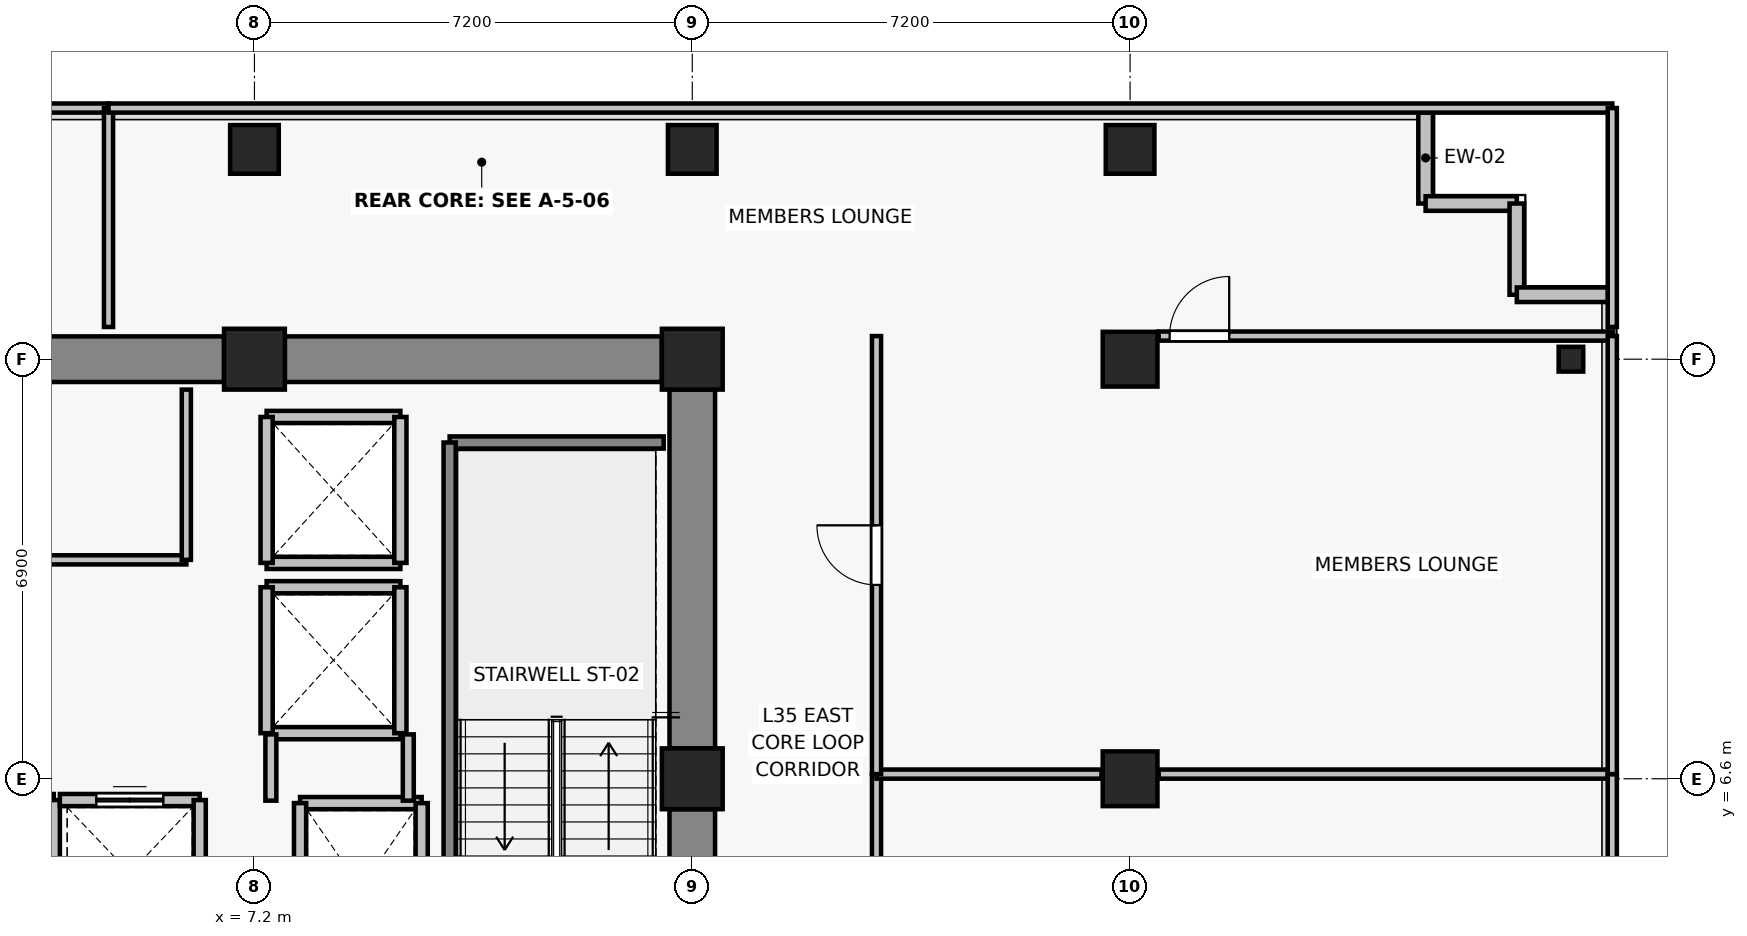
"""IFC4 building model, lengths in metres.
Left out: names, types, materials, properties, quantities, classifications, styles, units other than length and angle.
Written with IfcOpenShell. Run it as: python <this file> out.ifc"""

import sys

from ifc_helpers import new_model, si_unit, direction, frame, frame_2d, origin, origin_2d, place, context, subcontext, project, spatial, rectangle, i_section, extrude, source, transform, mapped, element, fill, save


model = new_model("IFC4")
c1 = context("Model", 3, precision=1e-05, world=origin(), true_north=direction((0.0, 1.0)))
c2 = subcontext(c1, "Body", "Model", "MODEL_VIEW")
j1 = project(units=[si_unit("LENGTHUNIT", "METRE"), si_unit("PLANEANGLEUNIT", "RADIAN")], contexts=[c1])
p1 = place(None, origin())
s1 = spatial("IfcSite", under=j1, at=p1, CompositionType="ELEMENT")
p2 = place(p1, origin())
s2 = spatial("IfcBuilding", under=s1, at=p2, CompositionType="ELEMENT")
p3 = place(p2, frame((0.0, 0.0, 126.4)))
s3 = spatial("IfcBuildingStorey", under=s2, at=p3, CompositionType="ELEMENT", Elevation=126.4)
for number, where, z_axis, x_axis in (
    (1, (14.4, 6.6, 0.0), (0.0, 0.0, 1.0), (1.0, 0.0, 0.0)),
    (2, (7.2, 13.5, 0.0), (0.0, 0.0, 1.0), (1.0, 0.0, 0.0)),
    (3, (14.4, 13.5, 0.0), (0.0, 0.0, 1.0), (1.0, 0.0, 0.0)),
):
    element("IfcColumn", number, at=place(p3, frame(where, z_axis=z_axis, x_axis=x_axis)), inside=s3, PredefinedType="COLUMN", context=c2, shape_type="SweptSolid", body=[
        extrude(rectangle(XDim=1.0, YDim=1.0, at=origin_2d()), origin(), (0.0, 0.0, 1.0), 3.3),
    ])
for number, where, z_axis, x_axis in (
    (4, (21.6, 6.6, 0.0), (0.0, 0.0, 1.0), (1.0, 0.0, 0.0)),
    (5, (21.6, 13.5, 0.0), (0.0, 0.0, 1.0), (1.0, 0.0, 0.0)),
):
    element("IfcColumn", number, at=place(p3, frame(where, z_axis=z_axis, x_axis=x_axis)), inside=s3, PredefinedType="COLUMN", context=c2, shape_type="SweptSolid", body=[
        extrude(rectangle(XDim=0.9, YDim=0.9, at=origin_2d()), origin(), (0.0, 0.0, 1.0), 3.3),
    ])
for number, where, z_axis, x_axis in (
    (6, (7.2, 16.95, 0.0), (0.0, 0.0, 1.0), (1.0, 0.0, 0.0)),
    (7, (14.4, 16.95, 0.0), (0.0, 0.0, 1.0), (1.0, 0.0, 0.0)),
    (8, (21.6, 16.95, 0.0), (0.0, 0.0, 1.0), (1.0, 0.0, 0.0)),
):
    element("IfcColumn", number, at=place(p3, frame(where, z_axis=z_axis, x_axis=x_axis)), inside=s3, PredefinedType="COLUMN", context=c2, shape_type="SweptSolid", body=[
        extrude(rectangle(XDim=0.8, YDim=0.8, at=origin_2d()), origin(), (0.0, 0.0, 1.0), 3.3),
    ])
p4 = place(p3, frame((28.85, 13.5, 0.0), z_axis=(0.0, 0.0, 1.0), x_axis=(1.0, 0.0, 0.0)))
e9 = element("IfcColumn", 9, at=p4, inside=s3, PredefinedType="COLUMN", context=c2, shape_type="SweptSolid", body=[
    extrude(i_section(OverallWidth=0.404, OverallDepth=0.407, WebThickness=0.022, FlangeThickness=0.032, FilletRadius=0.015, at=origin_2d()), origin(), (0.0, 0.0, 1.0), 3.3),
])
p5 = place(p3, frame((-6.7, 13.5, 0.0), z_axis=(0.0, 0.0, 1.0), x_axis=(1.0, 0.0, 0.0)))
e10 = element("IfcWall", 10, at=p5, inside=s3, PredefinedType="SHEAR", context=c2, shape_type="SweptSolid", body=[
    extrude(rectangle(XDim=13.4, YDim=0.75, at=frame_2d((6.7, 0.0))), origin(), (0.0, 0.0, 1.0), 3.075),
])
p6 = place(p3, frame((7.7, 13.5, 0.0), z_axis=(0.0, 0.0, 1.0), x_axis=(1.0, 0.0, 0.0)))
e11 = element("IfcWall", 11, at=p6, inside=s3, PredefinedType="SHEAR", context=c2, shape_type="SweptSolid", body=[
    extrude(rectangle(XDim=6.2, YDim=0.75, at=frame_2d((3.1, 0.0))), origin(), (0.0, 0.0, 1.0), 3.075),
])
p7 = place(p3, frame((14.4, -0.7, 0.0), z_axis=(0.0, 0.0, 1.0), x_axis=(0.0, 1.0, 0.0)))
e12 = element("IfcWall", 12, at=p7, inside=s3, PredefinedType="SHEAR", context=c2, shape_type="SweptSolid", body=[
    extrude(rectangle(XDim=6.8, YDim=0.75, at=frame_2d((3.4, 0.0))), origin(), (0.0, 0.0, 1.0), 3.075),
])
p8 = place(p3, frame((14.4, 7.1, 0.0), z_axis=(0.0, 0.0, 1.0), x_axis=(0.0, 1.0, 0.0)))
e13 = element("IfcWall", 13, at=p8, inside=s3, PredefinedType="SHEAR", context=c2, shape_type="SweptSolid", body=[
    extrude(rectangle(XDim=5.9, YDim=0.75, at=frame_2d((2.95, 0.0))), origin(), (0.0, 0.0, 1.0), 3.075),
])
for number, where, z_axis, x_axis in (
    (14, (26.46, 16.06, 0.0), (0.0, 0.0, 1.0), (0.0, 1.0, 0.0)),
    (15, (27.96, 16.06, 0.0), (0.0, 0.0, 1.0), (-1.0, 0.0, 0.0)),
    (16, (27.96, 14.56, 0.0), (0.0, 0.0, 1.0), (0.0, 1.0, 0.0)),
    (17, (29.46, 14.56, 0.0), (0.0, 0.0, 1.0), (-1.0, 0.0, 0.0)),
):
    element("IfcWall", number, at=place(p3, frame(where, z_axis=z_axis, x_axis=x_axis)), inside=s3, PredefinedType="SOLIDWALL", context=c2, shape_type="SweptSolid", body=[
        extrude(rectangle(XDim=1.5, YDim=0.24, at=frame_2d((0.75, 0.0))), origin(), (0.0, 0.0, 1.0), 3.075),
    ])
p9 = place(p3, frame((7.95, 6.2, 0.0), z_axis=(0.0, 0.0, 1.0), x_axis=(1.0, 0.0, 0.0)))
e18 = element("IfcWall", 18, at=p9, inside=s3, PredefinedType="SOLIDWALL", context=c2, shape_type="SweptSolid", body=[
    extrude(rectangle(XDim=2.0, YDim=0.2, at=frame_2d((1.0, 0.0))), origin(), (0.0, 0.0, 1.0), 3.075),
])
for number, where, z_axis, x_axis in (
    (19, (7.95, 3.4, 0.0), (0.0, 0.0, 1.0), (0.0, 1.0, 0.0)),
    (20, (9.95, 6.2, 0.0), (0.0, 0.0, 1.0), (0.0, -1.0, 0.0)),
):
    element("IfcWall", number, at=place(p3, frame(where, z_axis=z_axis, x_axis=x_axis)), inside=s3, PredefinedType="SOLIDWALL", context=c2, shape_type="SweptSolid", body=[
        extrude(rectangle(XDim=2.8, YDim=0.2, at=frame_2d((1.4, 0.0))), origin(), (0.0, 0.0, 1.0), 3.075),
    ])
p10 = place(p3, frame((1.6, 6.25, 0.0), z_axis=(0.0, 0.0, 1.0), x_axis=(1.0, 0.0, 0.0)))
e21 = element("IfcWall", 21, at=p10, inside=s3, PredefinedType="SOLIDWALL", context=c2, shape_type="SweptSolid", body=[
    extrude(rectangle(XDim=2.3, YDim=0.2, at=frame_2d((1.15, 0.0))), origin(), (0.0, 0.0, 1.0), 3.075),
])
p11 = place(p10, frame((0.6, 0.0, 0.0)))
e22 = element("IfcOpeningElement", 22, at=p11, cuts=e21, PredefinedType="OPENING", context=c2, shape_type="SweptSolid", body=[
    extrude(rectangle(XDim=1.1, YDim=2.2, at=frame_2d((0.55, 1.1))), frame((0.0, 0.11, 0.0), z_axis=(0.0, -1.0, 0.0), x_axis=(1.0, 0.0, 0.0)), (0.0, 0.0, 1.0), 0.22),
])
p12 = place(p3, frame((3.9, 6.25, 0.0), z_axis=(0.0, 0.0, 1.0), x_axis=(0.0, -1.0, 0.0)))
e23 = element("IfcWall", 23, at=p12, inside=s3, PredefinedType="SOLIDWALL", context=c2, shape_type="SweptSolid", body=[
    extrude(rectangle(XDim=2.4, YDim=0.2, at=frame_2d((1.2, 0.0))), origin(), (0.0, 0.0, 1.0), 3.075),
])
p13 = place(p3, frame((4.0, 6.25, 0.0), z_axis=(0.0, 0.0, 1.0), x_axis=(1.0, 0.0, 0.0)))
e24 = element("IfcWall", 24, at=p13, inside=s3, PredefinedType="SOLIDWALL", context=c2, shape_type="SweptSolid", body=[
    extrude(rectangle(XDim=2.3, YDim=0.2, at=frame_2d((1.15, 0.0))), origin(), (0.0, 0.0, 1.0), 3.075),
])
p14 = place(p13, frame((0.6, 0.0, 0.0)))
e25 = element("IfcOpeningElement", 25, at=p14, cuts=e24, PredefinedType="OPENING", context=c2, shape_type="SweptSolid", body=[
    extrude(rectangle(XDim=1.1, YDim=2.2, at=frame_2d((0.55, 1.1))), frame((0.0, 0.11, 0.0), z_axis=(0.0, -1.0, 0.0), x_axis=(1.0, 0.0, 0.0)), (0.0, 0.0, 1.0), 0.22),
])
p15 = place(p3, frame((6.3, 6.25, 0.0), z_axis=(0.0, 0.0, 1.0), x_axis=(0.0, -1.0, 0.0)))
e26 = element("IfcWall", 26, at=p15, inside=s3, PredefinedType="SOLIDWALL", context=c2, shape_type="SweptSolid", body=[
    extrude(rectangle(XDim=2.4, YDim=0.2, at=frame_2d((1.2, 0.0))), origin(), (0.0, 0.0, 1.0), 3.075),
])
for number, where, z_axis, x_axis in (
    (27, (9.6, 7.35, 0.0), (0.0, 0.0, 1.0), (-1.0, 0.0, 0.0)),
    (28, (7.4, 9.75, 0.0), (0.0, 0.0, 1.0), (1.0, 0.0, 0.0)),
):
    element("IfcWall", number, at=place(p3, frame(where, z_axis=z_axis, x_axis=x_axis)), inside=s3, PredefinedType="SOLIDWALL", context=c2, shape_type="SweptSolid", body=[
        extrude(rectangle(XDim=2.2, YDim=0.2, at=frame_2d((1.1, 0.0))), origin(), (0.0, 0.0, 1.0), 2.515),
    ])
p16 = place(p3, frame((7.4, 7.35, 0.0), z_axis=(0.0, 0.0, 1.0), x_axis=(0.0, 1.0, 0.0)))
e29 = element("IfcWall", 29, at=p16, inside=s3, PredefinedType="SOLIDWALL", context=c2, shape_type="SweptSolid", body=[
    extrude(rectangle(XDim=2.4, YDim=0.2, at=frame_2d((1.2, 0.0))), origin(), (0.0, 0.0, 1.0), 2.515),
])
p17 = place(p3, frame((9.6, 9.75, 0.0), z_axis=(0.0, 0.0, 1.0), x_axis=(0.0, -1.0, 0.0)))
e30 = element("IfcWall", 30, at=p17, inside=s3, PredefinedType="SOLIDWALL", context=c2, shape_type="SweptSolid", body=[
    extrude(rectangle(XDim=2.4, YDim=0.2, at=frame_2d((1.2, 0.0))), origin(), (0.0, 0.0, 1.0), 3.075),
])
for number, where, z_axis, x_axis in (
    (31, (9.6, 10.15, 0.0), (0.0, 0.0, 1.0), (-1.0, 0.0, 0.0)),
    (32, (7.4, 12.55, 0.0), (0.0, 0.0, 1.0), (1.0, 0.0, 0.0)),
):
    element("IfcWall", number, at=place(p3, frame(where, z_axis=z_axis, x_axis=x_axis)), inside=s3, PredefinedType="SOLIDWALL", context=c2, shape_type="SweptSolid", body=[
        extrude(rectangle(XDim=2.2, YDim=0.2, at=frame_2d((1.1, 0.0))), origin(), (0.0, 0.0, 1.0), 2.515),
    ])
p18 = place(p3, frame((7.4, 10.15, 0.0), z_axis=(0.0, 0.0, 1.0), x_axis=(0.0, 1.0, 0.0)))
e33 = element("IfcWall", 33, at=p18, inside=s3, PredefinedType="SOLIDWALL", context=c2, shape_type="SweptSolid", body=[
    extrude(rectangle(XDim=2.4, YDim=0.2, at=frame_2d((1.2, 0.0))), origin(), (0.0, 0.0, 1.0), 2.515),
])
p19 = place(p3, frame((9.6, 12.55, 0.0), z_axis=(0.0, 0.0, 1.0), x_axis=(0.0, -1.0, 0.0)))
e34 = element("IfcWall", 34, at=p19, inside=s3, PredefinedType="SOLIDWALL", context=c2, shape_type="SweptSolid", body=[
    extrude(rectangle(XDim=2.4, YDim=0.2, at=frame_2d((1.2, 0.0))), origin(), (0.0, 0.0, 1.0), 3.075),
])
p20 = place(p3, frame((10.41, 12.13, 0.0), z_axis=(0.0, 0.0, 1.0), x_axis=(1.0, 0.0, 0.0)))
e35 = element("IfcWall", 35, at=p20, inside=s3, PredefinedType="SOLIDWALL", context=c2, shape_type="SweptSolid", body=[
    extrude(rectangle(XDim=3.52, YDim=0.2, at=frame_2d((1.76, 0.0))), origin(), (0.0, 0.0, 1.0), 3.075),
])
p21 = place(p3, frame((10.41, 3.29, 0.0), z_axis=(0.0, 0.0, 1.0), x_axis=(0.0, 1.0, 0.0)))
e36 = element("IfcWall", 36, at=p21, inside=s3, PredefinedType="SOLIDWALL", context=c2, shape_type="SweptSolid", body=[
    extrude(rectangle(XDim=8.84, YDim=0.2, at=frame_2d((4.42, 0.0))), origin(), (0.0, 0.0, 1.0), 3.075),
])
p22 = place(p3, frame((7.47, 6.24, 0.0), z_axis=(0.0, 0.0, 1.0), x_axis=(0.0, 1.0, 0.0)))
e37 = element("IfcWall", 37, at=p22, inside=s3, PredefinedType="PARTITIONING", context=c2, shape_type="SweptSolid", body=[
    extrude(rectangle(XDim=1.09, YDim=0.18, at=frame_2d((0.545, 0.0))), origin(), (0.0, 0.0, 1.0), 2.515),
])
p23 = place(p3, frame((9.73, 7.33, 0.0), z_axis=(0.0, 0.0, 1.0), x_axis=(0.0, -1.0, 0.0)))
e38 = element("IfcWall", 38, at=p23, inside=s3, PredefinedType="PARTITIONING", context=c2, shape_type="SweptSolid", body=[
    extrude(rectangle(XDim=1.09, YDim=0.18, at=frame_2d((0.545, 0.0))), origin(), (0.0, 0.0, 1.0), 3.075),
])
p24 = place(p3, frame((6.08, 10.2, 0.0), z_axis=(0.0, 0.0, 1.0), x_axis=(-1.0, 0.0, 0.0)))
e39 = element("IfcWall", 39, at=p24, inside=s3, PredefinedType="PARTITIONING", context=c2, shape_type="SweptSolid", body=[
    extrude(rectangle(XDim=12.16, YDim=0.15, at=frame_2d((6.08, 0.0))), origin(), (0.0, 0.0, 1.0), 3.075),
])
p25 = place(p24, frame((7.005, 0.0, 0.0)))
e40 = element("IfcOpeningElement", 40, at=p25, cuts=e39, PredefinedType="OPENING", context=c2, shape_type="SweptSolid", body=[
    extrude(rectangle(XDim=1.15, YDim=2.15, at=frame_2d((0.575, 1.075))), frame((0.0, 0.085, 0.0), z_axis=(0.0, -1.0, 0.0), x_axis=(1.0, 0.0, 0.0)), (0.0, 0.0, 1.0), 0.17),
])
p26 = place(p3, frame((6.08, 13.0, 0.0), z_axis=(0.0, 0.0, 1.0), x_axis=(0.0, -1.0, 0.0)))
e41 = element("IfcWall", 41, at=p26, inside=s3, PredefinedType="PARTITIONING", context=c2, shape_type="SweptSolid", body=[
    extrude(rectangle(XDim=2.8, YDim=0.15, at=frame_2d((1.4, 0.0))), origin(), (0.0, 0.0, 1.0), 3.075),
])
p27 = place(p3, frame((22.07, 6.677, 0.0), z_axis=(0.0, 0.0, 1.0), x_axis=(1.0, 0.0, 0.0)))
e42 = element("IfcWall", 42, at=p27, inside=s3, PredefinedType="PARTITIONING", context=c2, shape_type="SweptSolid", body=[
    extrude(rectangle(XDim=7.46, YDim=0.15, at=frame_2d((3.73, 0.0))), origin(), (0.0, 0.0, 1.0), 2.565),
])
p28 = place(p3, frame((17.43, 1.46, 0.0), z_axis=(0.0, 0.0, 1.0), x_axis=(0.0, 1.0, 0.0)))
e43 = element("IfcWall", 43, at=p28, inside=s3, PredefinedType="PARTITIONING", context=c2, shape_type="SweptSolid", body=[
    extrude(rectangle(XDim=5.217, YDim=0.15, at=frame_2d((2.608, 0.0))), origin(), (0.0, 0.0, 1.0), 2.515),
])
p29 = place(p28, frame((2.118, 0.0, 0.0)))
e44 = element("IfcOpeningElement", 44, at=p29, cuts=e43, PredefinedType="OPENING", context=c2, shape_type="SweptSolid", body=[
    extrude(rectangle(XDim=0.98, YDim=2.15, at=frame_2d((0.49, 1.075))), frame((0.0, 0.085, 0.0), z_axis=(0.0, -1.0, 0.0), x_axis=(1.0, 0.0, 0.0)), (0.0, 0.0, 1.0), 0.17),
])
p30 = place(p3, frame((29.53, 6.677, 0.0), z_axis=(0.0, 0.0, 1.0), x_axis=(0.0, -1.0, 0.0)))
e45 = element("IfcWall", 45, at=p30, inside=s3, PredefinedType="PARTITIONING", context=c2, shape_type="SweptSolid", body=[
    extrude(rectangle(XDim=5.217, YDim=0.15, at=frame_2d((2.608, 0.0))), origin(), (0.0, 0.0, 1.0), 3.075),
])
p31 = place(p3, frame((21.13, 6.677, 0.0), z_axis=(0.0, 0.0, 1.0), x_axis=(-1.0, 0.0, 0.0)))
e46 = element("IfcWall", 46, at=p31, inside=s3, PredefinedType="PARTITIONING", context=c2, shape_type="SweptSolid", body=[
    extrude(rectangle(XDim=3.7, YDim=0.15, at=frame_2d((1.85, 0.0))), origin(), (0.0, 0.0, 1.0), 2.515),
])
p32 = place(p3, frame((22.07, 13.88, 0.0), z_axis=(0.0, 0.0, 1.0), x_axis=(1.0, 0.0, 0.0)))
e47 = element("IfcWall", 47, at=p32, inside=s3, PredefinedType="PARTITIONING", context=c2, shape_type="SweptSolid", body=[
    extrude(rectangle(XDim=7.46, YDim=0.15, at=frame_2d((3.73, 0.0))), origin(), (0.0, 0.0, 1.0), 3.075),
])
p33 = place(p32, frame((0.18, 0.0, 0.0)))
e48 = element("IfcOpeningElement", 48, at=p33, cuts=e47, PredefinedType="OPENING", context=c2, shape_type="SweptSolid", body=[
    extrude(rectangle(XDim=0.98, YDim=2.15, at=frame_2d((0.49, 1.075))), frame((0.0, 0.085, 0.0), z_axis=(0.0, -1.0, 0.0), x_axis=(1.0, 0.0, 0.0)), (0.0, 0.0, 1.0), 0.17),
])
p34 = place(p3, frame((17.43, 6.677, 0.0), z_axis=(0.0, 0.0, 1.0), x_axis=(0.0, 1.0, 0.0)))
e49 = element("IfcWall", 49, at=p34, inside=s3, PredefinedType="PARTITIONING", context=c2, shape_type="SweptSolid", body=[
    extrude(rectangle(XDim=7.203, YDim=0.15, at=frame_2d((3.602, 0.0))), origin(), (0.0, 0.0, 1.0), 2.515),
])
p35 = place(p34, frame((3.111, 0.0, 0.0)))
e50 = element("IfcOpeningElement", 50, at=p35, cuts=e49, PredefinedType="OPENING", context=c2, shape_type="SweptSolid", body=[
    extrude(rectangle(XDim=0.98, YDim=2.15, at=frame_2d((0.49, 1.075))), frame((0.0, 0.085, 0.0), z_axis=(0.0, -1.0, 0.0), x_axis=(1.0, 0.0, 0.0)), (0.0, 0.0, 1.0), 0.17),
])
p36 = place(p3, frame((29.53, 13.88, 0.0), z_axis=(0.0, 0.0, 1.0), x_axis=(0.0, -1.0, 0.0)))
e51 = element("IfcWall", 51, at=p36, inside=s3, PredefinedType="PARTITIONING", context=c2, shape_type="SweptSolid", body=[
    extrude(rectangle(XDim=7.203, YDim=0.15, at=frame_2d((3.602, 0.0))), origin(), (0.0, 0.0, 1.0), 3.075),
])
p37 = place(p3, frame((-25.53, 17.63, 0.0), z_axis=(0.0, 0.0, 1.0), x_axis=(1.0, 0.0, 0.0)))
e52 = element("IfcWall", 52, at=p37, inside=s3, PredefinedType="PARTITIONING", context=c2, shape_type="SweptSolid", body=[
    extrude(rectangle(XDim=30.33, YDim=0.15, at=frame_2d((15.165, 0.0))), origin(), (0.0, 0.0, 1.0), 3.075),
])
p38 = place(p3, frame((4.8, 17.63, 0.0), z_axis=(0.0, 0.0, 1.0), x_axis=(0.0, -1.0, 0.0)))
e53 = element("IfcWall", 53, at=p38, inside=s3, PredefinedType="PARTITIONING", context=c2, shape_type="SweptSolid", body=[
    extrude(rectangle(XDim=3.6, YDim=0.15, at=frame_2d((1.8, 0.0))), origin(), (0.0, 0.0, 1.0), 2.565),
])
p39 = place(p3, frame((4.8, 17.63, 0.0), z_axis=(0.0, 0.0, 1.0), x_axis=(1.0, 0.0, 0.0)))
e54 = element("IfcWall", 54, at=p39, inside=s3, PredefinedType="PARTITIONING", context=c2, shape_type="SweptSolid", body=[
    extrude(rectangle(XDim=24.73, YDim=0.15, at=frame_2d((12.365, 0.0))), origin(), (0.0, 0.0, 1.0), 3.075),
])
p40 = place(p3, frame((29.53, 17.63, 0.0), z_axis=(0.0, 0.0, 1.0), x_axis=(0.0, -1.0, 0.0)))
e55 = element("IfcWall", 55, at=p40, inside=s3, PredefinedType="PARTITIONING", context=c2, shape_type="SweptSolid", body=[
    extrude(rectangle(XDim=3.6, YDim=0.15, at=frame_2d((1.8, 0.0))), origin(), (0.0, 0.0, 1.0), 3.075),
])
m1 = source(origin(), c2, "Body", "SweptSolid", [
    extrude(rectangle(XDim=1.1, YDim=2.2, at=frame_2d((0.55, 1.1))), frame((0.0, 0.025, 0.0), z_axis=(0.0, -1.0, 0.0), x_axis=(1.0, 0.0, 0.0)), (0.0, 0.0, 1.0), 0.05),
])
p41 = place(p14, origin())
e56 = element("IfcDoor", 56, at=p41, inside=s3, OperationType="DOUBLE_DOOR_SLIDING", PredefinedType="DOOR", context=c2, shape_type="MappedRepresentation", body=[
    mapped(m1, transform((0.0, 0.0, 0.0), x_axis=(1.0, 0.0, 0.0), y_axis=(0.0, 1.0, 0.0), z_axis=(0.0, 0.0, 1.0), scale=1.0)),
])
fill(e25, e56)
m2 = source(origin(), c2, "Body", "SweptSolid", [
    extrude(rectangle(XDim=0.98, YDim=2.15, at=frame_2d((0.49, 1.075))), frame((0.0, 0.025, 0.0), z_axis=(0.0, -1.0, 0.0), x_axis=(1.0, 0.0, 0.0)), (0.0, 0.0, 1.0), 0.05),
])
p42 = place(p35, origin())
e57 = element("IfcDoor", 57, at=p42, inside=s3, OperationType="SINGLE_SWING_RIGHT", PredefinedType="DOOR", context=c2, shape_type="MappedRepresentation", body=[
    mapped(m2, transform((0.0, 0.0, 0.0), x_axis=(1.0, 0.0, 0.0), y_axis=(0.0, 1.0, 0.0), z_axis=(0.0, 0.0, 1.0), scale=1.0)),
])
fill(e50, e57)
p43 = place(p33, origin())
e58 = element("IfcDoor", 58, at=p43, inside=s3, OperationType="SINGLE_SWING_RIGHT", PredefinedType="DOOR", context=c2, shape_type="MappedRepresentation", body=[
    mapped(m2, transform((0.0, 0.0, 0.0), x_axis=(1.0, 0.0, 0.0), y_axis=(0.0, 1.0, 0.0), z_axis=(0.0, 0.0, 1.0), scale=1.0)),
])
fill(e48, e58)
save(model, sys.argv[1])
